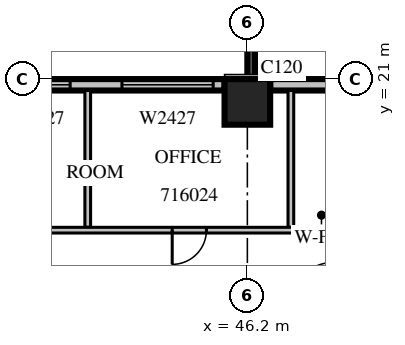
"""IFC4 building model, lengths in metres.
Left out: names, types, materials, properties, quantities, classifications, styles, units other than length and angle.
Written with IfcOpenShell. Run it as: python <this file> out.ifc"""

import sys

from ifc_helpers import new_model, si_unit, direction, frame, frame_2d, origin, origin_2d, place, context, subcontext, project, spatial, rectangle, extrude, source, transform, mapped, element, fill, save


model = new_model("IFC4")
c1 = context("Model", 3, precision=1e-05, world=origin(), true_north=direction((0.0, 1.0)))
c2 = subcontext(c1, "Body", "Model", "MODEL_VIEW")
j1 = project(units=[si_unit("LENGTHUNIT", "METRE"), si_unit("PLANEANGLEUNIT", "RADIAN")], contexts=[c1])
p1 = place(None, origin())
s1 = spatial("IfcSite", under=j1, at=p1, CompositionType="ELEMENT")
p2 = place(p1, origin())
s2 = spatial("IfcBuilding", under=s1, at=p2, CompositionType="ELEMENT")
p3 = place(p2, frame((0.0, 0.0, 78.3)))
s3 = spatial("IfcBuildingStorey", under=s2, at=p3, CompositionType="ELEMENT", Elevation=78.3)
m1 = source(origin(), c2, "Body", "SweptSolid", [
    extrude(rectangle(XDim=1.2, YDim=1.2, at=origin_2d()), origin(), (0.0, 0.0, 1.0), 4.2),
])
p4 = place(p3, frame((46.2, 20.4, 0.0), z_axis=(0.0, 0.0, 1.0), x_axis=(1.0, 0.0, 0.0)))
e1 = element("IfcColumn", 1, at=p4, inside=s3, PredefinedType="COLUMN", context=c2, shape_type="MappedRepresentation", body=[
    mapped(m1, transform((0.0, 0.0, 0.0), scale=1.0)),
])
m2 = source(origin(), c2, "Body", "SweptSolid", [
    extrude(rectangle(XDim=3.9, YDim=0.2, at=frame_2d((1.95, 0.0))), origin(), (0.0, 0.0, 1.0), 3.79),
])
p5 = place(p3, frame((46.3, 21.0, 0.0), z_axis=(0.0, 0.0, 1.0), x_axis=(0.0, 1.0, 0.0)))
e2 = element("IfcWall", 2, at=p5, inside=s3, PredefinedType="SOLIDWALL", context=c2, shape_type="MappedRepresentation", body=[
    mapped(m2, transform((0.0, 0.0, 0.0), scale=1.0)),
])
m3 = source(origin(), c2, "Body", "SweptSolid", [
    extrude(rectangle(XDim=2.4, YDim=2.7, at=frame_2d((1.2, 1.35))), frame((0.0, 0.11, 0.0), z_axis=(0.0, -1.0, 0.0), x_axis=(1.0, 0.0, 0.0)), (0.0, 0.0, 1.0), 0.22),
])
p6 = place(p5, frame((0.75, 0.0, 0.6)))
e3 = element("IfcOpeningElement", 3, at=p6, cuts=e2, PredefinedType="OPENING", context=c2, shape_type="MappedRepresentation", body=[
    mapped(m3, transform((0.0, 0.0, 0.0), scale=1.0)),
])
m4 = source(origin(), c2, "Body", "SweptSolid", [
    extrude(rectangle(XDim=4.68, YDim=0.3, at=frame_2d((2.34, 0.0))), origin(), (0.0, 0.0, 1.0), 3.8),
])
p7 = place(p3, frame((51.48, 20.85, 0.0), z_axis=(0.0, 0.0, 1.0), x_axis=(-1.0, 0.0, 0.0)))
e4 = element("IfcWall", 4, at=p7, inside=s3, PredefinedType="STANDARD", context=c2, shape_type="MappedRepresentation", body=[
    mapped(m4, transform((0.0, 0.0, 0.0), scale=1.0)),
])
m5 = source(origin(), c2, "Body", "SweptSolid", [
    extrude(rectangle(XDim=1.0, YDim=2.1, at=frame_2d((0.5, 1.05))), frame((0.0, 0.16, 0.0), z_axis=(0.0, -1.0, 0.0), x_axis=(1.0, 0.0, 0.0)), (0.0, 0.0, 1.0), 0.32),
])
p8 = place(p7, frame((1.887, 0.0, 0.0)))
e5 = element("IfcOpeningElement", 5, at=p8, cuts=e4, PredefinedType="OPENING", context=c2, shape_type="MappedRepresentation", body=[
    mapped(m5, transform((0.0, 0.0, 0.0), scale=1.0)),
])
m6 = source(origin(), c2, "Body", "SweptSolid", [
    extrude(rectangle(XDim=7.2, YDim=0.3, at=frame_2d((3.6, 0.0))), origin(), (0.0, 0.0, 1.0), 3.8),
])
p9 = place(p3, frame((45.6, 20.85, 0.0), z_axis=(0.0, 0.0, 1.0), x_axis=(-1.0, 0.0, 0.0)))
e6 = element("IfcWall", 6, at=p9, inside=s3, PredefinedType="STANDARD", context=c2, shape_type="MappedRepresentation", body=[
    mapped(m6, transform((0.0, 0.0, 0.0), scale=1.0)),
])
m7 = source(origin(), c2, "Body", "SweptSolid", [
    extrude(rectangle(XDim=2.4, YDim=2.7, at=frame_2d((1.2, 1.35))), frame((0.0, 0.16, 0.0), z_axis=(0.0, -1.0, 0.0), x_axis=(1.0, 0.0, 0.0)), (0.0, 0.0, 1.0), 0.32),
])
p10 = place(p9, frame((0.3, 0.0, 0.6)))
e7 = element("IfcOpeningElement", 7, at=p10, cuts=e6, PredefinedType="OPENING", context=c2, shape_type="MappedRepresentation", body=[
    mapped(m7, transform((0.0, 0.0, 0.0), scale=1.0)),
])
m8 = source(origin(), c2, "Body", "SweptSolid", [
    extrude(rectangle(XDim=1.8, YDim=2.7, at=frame_2d((0.9, 1.35))), frame((0.0, 0.16, 0.0), z_axis=(0.0, -1.0, 0.0), x_axis=(1.0, 0.0, 0.0)), (0.0, 0.0, 1.0), 0.32),
])
p11 = place(p9, frame((4.062, 0.0, 0.6)))
e8 = element("IfcOpeningElement", 8, at=p11, cuts=e6, PredefinedType="OPENING", context=c2, shape_type="MappedRepresentation", body=[
    mapped(m8, transform((0.0, 0.0, 0.0), scale=1.0)),
])
m9 = source(origin(), c2, "Body", "SweptSolid", [
    extrude(rectangle(XDim=3.6, YDim=0.15, at=frame_2d((1.8, 0.0))), origin(), (0.0, 0.0, 1.0), 3.8),
])
for number, where, z_axis, x_axis in (
    (9, (47.345, 20.7, 0.0), (0.0, 0.0, 1.0), (0.0, -1.0, 0.0)),
    (10, (42.0, 17.1, 0.0), (0.0, 0.0, 1.0), (0.0, 1.0, 0.0)),
):
    element("IfcWall", number, at=place(p3, frame(where, z_axis=z_axis, x_axis=x_axis)), inside=s3, PredefinedType="PARTITIONING", context=c2, shape_type="MappedRepresentation", body=[
        mapped(m9, transform((0.0, 0.0, 0.0), scale=1.0)),
    ])
m10 = source(origin(), c2, "Body", "SweptSolid", [
    extrude(rectangle(XDim=37.5, YDim=0.15, at=frame_2d((18.75, 0.0))), origin(), (0.0, 0.0, 1.0), 3.8),
])
p12 = place(p3, frame((29.4, 17.025, 0.0), z_axis=(0.0, 0.0, 1.0), x_axis=(1.0, 0.0, 0.0)))
e11 = element("IfcWall", 11, at=p12, inside=s3, PredefinedType="PARTITIONING", context=c2, shape_type="MappedRepresentation", body=[
    mapped(m10, transform((0.0, 0.0, 0.0), scale=1.0)),
])
m11 = source(origin(), c2, "Body", "SweptSolid", [
    extrude(rectangle(XDim=1.0, YDim=2.1, at=frame_2d((0.5, 1.05))), frame((0.0, 0.085, 0.0), z_axis=(0.0, -1.0, 0.0), x_axis=(1.0, 0.0, 0.0)), (0.0, 0.0, 1.0), 0.17),
])
p13 = place(p12, frame((1.357, 0.0, 0.0)))
e12 = element("IfcOpeningElement", 12, at=p13, cuts=e11, PredefinedType="OPENING", context=c2, shape_type="MappedRepresentation", body=[
    mapped(m11, transform((0.0, 0.0, 0.0), scale=1.0)),
])
p14 = place(p12, frame((4.669, 0.0, 0.0)))
e13 = element("IfcOpeningElement", 13, at=p14, cuts=e11, PredefinedType="OPENING", context=c2, shape_type="MappedRepresentation", body=[
    mapped(m11, transform((0.0, 0.0, 0.0), scale=1.0)),
])
p15 = place(p12, frame((7.012, 0.0, 0.0)))
e14 = element("IfcOpeningElement", 14, at=p15, cuts=e11, PredefinedType="OPENING", context=c2, shape_type="MappedRepresentation", body=[
    mapped(m11, transform((0.0, 0.0, 0.0), scale=1.0)),
])
p16 = place(p12, frame((10.0, 0.0, 0.0)))
e15 = element("IfcOpeningElement", 15, at=p16, cuts=e11, PredefinedType="OPENING", context=c2, shape_type="MappedRepresentation", body=[
    mapped(m11, transform((0.0, 0.0, 0.0), scale=1.0)),
])
m12 = source(origin(), c2, "Body", "SweptSolid", [
    extrude(rectangle(XDim=0.9, YDim=2.1, at=frame_2d((0.45, 1.05))), frame((0.0, 0.085, 0.0), z_axis=(0.0, -1.0, 0.0), x_axis=(1.0, 0.0, 0.0)), (0.0, 0.0, 1.0), 0.17),
])
p17 = place(p12, frame((14.822, 0.0, 0.0)))
e16 = element("IfcOpeningElement", 16, at=p17, cuts=e11, PredefinedType="OPENING", context=c2, shape_type="MappedRepresentation", body=[
    mapped(m12, transform((0.0, 0.0, 0.0), scale=1.0)),
])
p18 = place(p12, frame((20.13, 0.0, 0.0)))
e17 = element("IfcOpeningElement", 17, at=p18, cuts=e11, PredefinedType="OPENING", context=c2, shape_type="MappedRepresentation", body=[
    mapped(m12, transform((0.0, 0.0, 0.0), scale=1.0)),
])
p19 = place(p12, frame((25.438, 0.0, 0.0)))
e18 = element("IfcOpeningElement", 18, at=p19, cuts=e11, PredefinedType="OPENING", context=c2, shape_type="MappedRepresentation", body=[
    mapped(m12, transform((0.0, 0.0, 0.0), scale=1.0)),
])
p20 = place(p12, frame((30.364, 0.0, 0.0)))
e19 = element("IfcOpeningElement", 19, at=p20, cuts=e11, PredefinedType="OPENING", context=c2, shape_type="MappedRepresentation", body=[
    mapped(m12, transform((0.0, 0.0, 0.0), scale=1.0)),
])
p21 = place(p12, frame((34.871, 0.0, 0.0)))
e20 = element("IfcOpeningElement", 20, at=p21, cuts=e11, PredefinedType="OPENING", context=c2, shape_type="MappedRepresentation", body=[
    mapped(m12, transform((0.0, 0.0, 0.0), scale=1.0)),
])
m13 = source(origin(), c2, "Body", "SweptSolid", [
    extrude(rectangle(XDim=2.4, YDim=2.7, at=frame_2d((1.2, 1.35))), frame((0.0, 0.03, 0.0), z_axis=(0.0, -1.0, 0.0), x_axis=(1.0, 0.0, 0.0)), (0.0, 0.0, 1.0), 0.06),
])
p22 = place(p10, origin())
e21 = element("IfcWindow", 21, at=p22, inside=s3, PartitioningType="SINGLE_PANEL", PredefinedType="WINDOW", context=c2, shape_type="MappedRepresentation", body=[
    mapped(m13, transform((0.0, 0.0, 0.0), scale=1.0)),
])
fill(e7, e21)
m14 = source(origin(), c2, "Body", "SweptSolid", [
    extrude(rectangle(XDim=1.8, YDim=2.7, at=frame_2d((0.9, 1.35))), frame((0.0, 0.03, 0.0), z_axis=(0.0, -1.0, 0.0), x_axis=(1.0, 0.0, 0.0)), (0.0, 0.0, 1.0), 0.06),
])
p23 = place(p11, origin())
e22 = element("IfcWindow", 22, at=p23, inside=s3, PartitioningType="SINGLE_PANEL", PredefinedType="WINDOW", context=c2, shape_type="MappedRepresentation", body=[
    mapped(m14, transform((0.0, 0.0, 0.0), scale=1.0)),
])
fill(e8, e22)
m15 = source(origin(), c2, "Body", "SweptSolid", [
    extrude(rectangle(XDim=0.9, YDim=2.1, at=frame_2d((0.45, 1.05))), frame((0.0, 0.025, 0.0), z_axis=(0.0, -1.0, 0.0), x_axis=(1.0, 0.0, 0.0)), (0.0, 0.0, 1.0), 0.05),
])
p24 = place(p17, origin())
e23 = element("IfcDoor", 23, at=p24, inside=s3, OperationType="SINGLE_SWING_RIGHT", PredefinedType="DOOR", context=c2, shape_type="MappedRepresentation", body=[
    mapped(m15, transform((0.0, 0.0, 0.0), scale=1.0)),
])
fill(e16, e23)
save(model, sys.argv[1])
